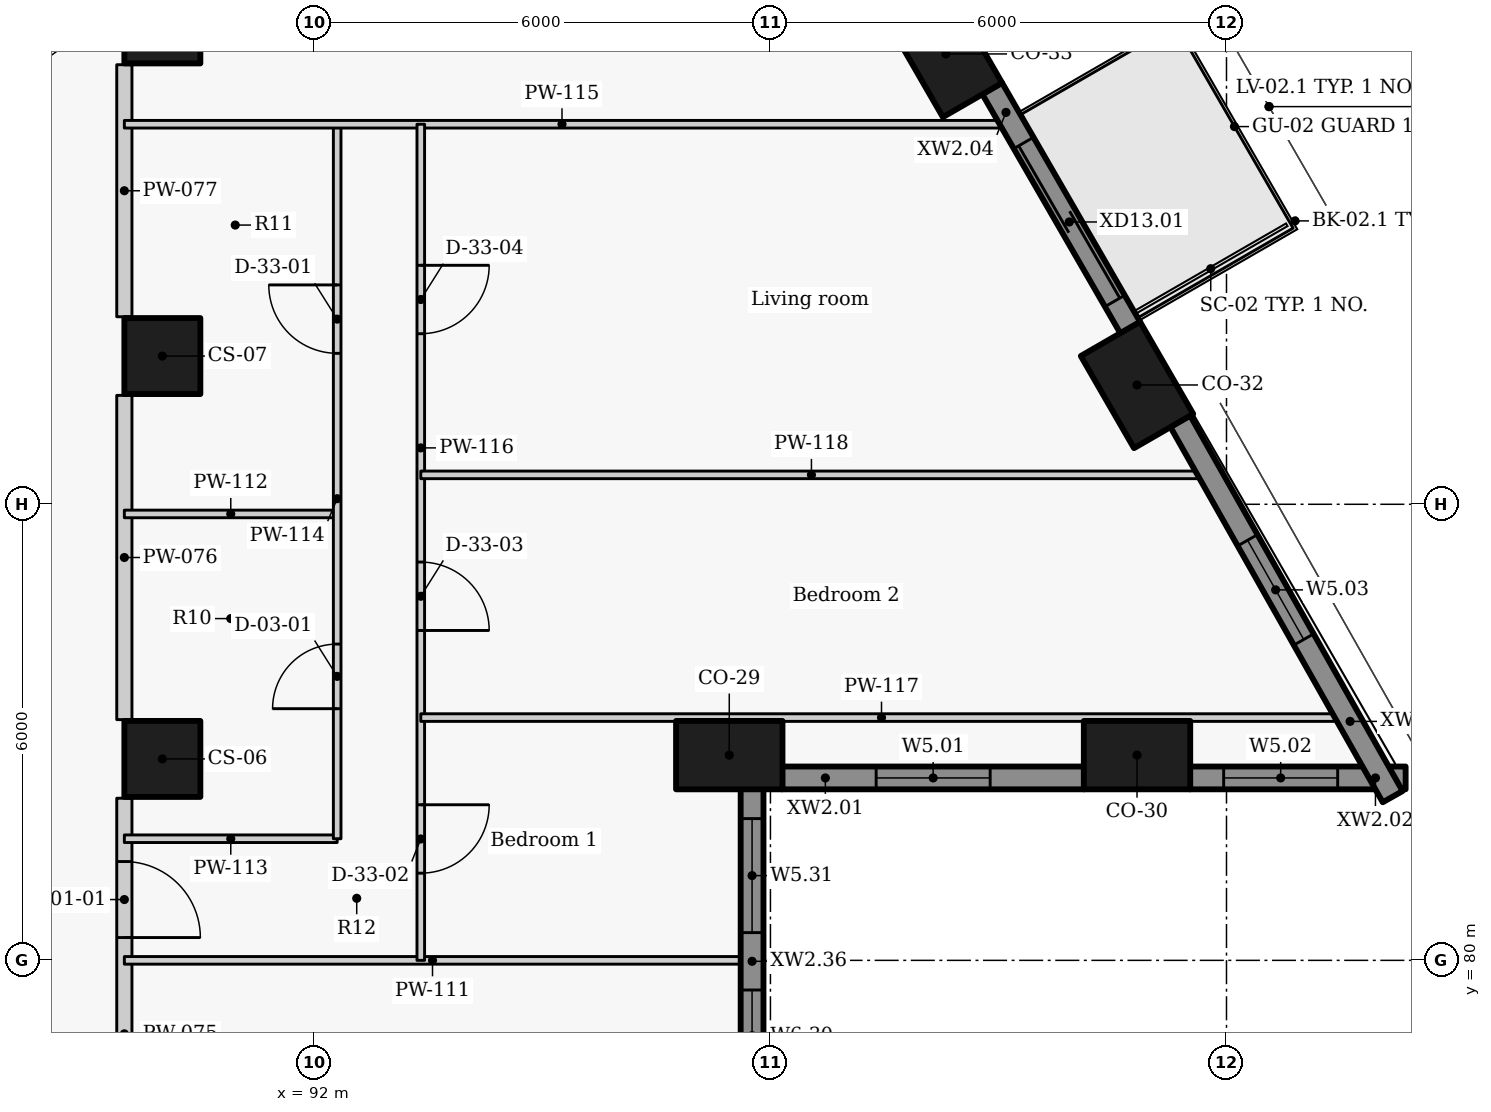
"""IFC4 building model, lengths in metres.
Left out: names, types, materials, properties, quantities, classifications, styles, units other than length and angle.
Written with IfcOpenShell. Run it as: python <this file> out.ifc"""

import sys

from ifc_helpers import new_model, si_unit, direction, frame, frame_2d, origin, origin_2d, place, context, subcontext, project, spatial, rectangle, extrude, element, fill, save


model = new_model("IFC4")
c1 = context("Model", 3, precision=1e-05, world=origin(), true_north=direction((0.0, 1.0)))
c2 = subcontext(c1, "Body", "Model", "MODEL_VIEW")
j1 = project(units=[si_unit("LENGTHUNIT", "METRE"), si_unit("PLANEANGLEUNIT", "RADIAN")], contexts=[c1])
p1 = place(None, origin())
s1 = spatial("IfcSite", under=j1, at=p1, CompositionType="ELEMENT")
p2 = place(p1, origin())
s2 = spatial("IfcBuilding", under=s1, at=p2, CompositionType="ELEMENT")
p3 = place(p2, frame((0.0, 0.0, 114.0)))
s3 = spatial("IfcBuildingStorey", under=s2, at=p3, CompositionType="ELEMENT", Elevation=114.0)
for number, where, z_axis, x_axis in (
    (1, (97.458, 82.7, 0.0), (0.0, 0.0, 1.0), (1.0, 0.0, 0.0)),
    (2, (102.823, 82.7, 0.0), (0.0, 0.0, 1.0), (1.0, 0.0, 0.0)),
    (3, (102.823, 87.57, 0.0), (0.0, 0.0, 1.0), (-0.5, 0.866, 0.0)),
    (4, (100.308, 91.925, 0.0), (0.0, 0.0, 1.0), (-0.5, 0.866, 0.0)),
):
    element("IfcColumn", number, at=place(p3, frame(where, z_axis=z_axis, x_axis=x_axis)), inside=s3, PredefinedType="COLUMN", context=c2, shape_type="SweptSolid", body=[
        extrude(rectangle(XDim=1.4, YDim=0.9, at=origin_2d()), origin(), (0.0, 0.0, 1.0), 3.3),
    ])
for number, where, z_axis, x_axis in (
    (5, (90.0, 82.65, 0.0), (0.0, 0.0, 1.0), (0.0, 1.0, 0.0)),
    (6, (90.0, 87.95, 0.0), (0.0, 0.0, 1.0), (0.0, 1.0, 0.0)),
    (7, (90.0, 92.3, 0.0), (0.0, 0.0, 1.0), (0.0, 1.0, 0.0)),
):
    element("IfcColumn", number, at=place(p3, frame(where, z_axis=z_axis, x_axis=x_axis)), inside=s3, PredefinedType="COLUMN", context=c2, shape_type="SweptSolid", body=[
        extrude(rectangle(XDim=1.0, YDim=1.0, at=origin_2d()), origin(), (0.0, 0.0, 1.0), 3.3),
    ])
p4 = place(p3, frame((98.154, 82.4, 0.0), z_axis=(0.0, 0.0, 1.0), x_axis=(1.0, 0.0, 0.0)))
e8 = element("IfcWall", 8, at=p4, inside=s3, PredefinedType="SOLIDWALL", context=c2, shape_type="SweptSolid", body=[
    extrude(rectangle(XDim=3.973, YDim=0.3, at=frame_2d((1.986, 0.0))), origin(), (0.0, 0.0, 1.0), 2.425),
])
p5 = place(p4, frame((1.236, 0.0, 0.9)))
e9 = element("IfcOpeningElement", 9, at=p5, cuts=e8, PredefinedType="OPENING", context=c2, shape_type="SweptSolid", body=[
    extrude(rectangle(XDim=1.5, YDim=1.1, at=frame_2d((0.75, 0.55))), frame((0.0, 0.16, 0.0), z_axis=(0.0, -1.0, 0.0), x_axis=(1.0, 0.0, 0.0)), (0.0, 0.0, 1.0), 0.32),
])
p6 = place(p3, frame((103.519, 82.4, 0.0), z_axis=(0.0, 0.0, 1.0), x_axis=(1.0, 0.0, 0.0)))
e10 = element("IfcWall", 10, at=p6, inside=s3, PredefinedType="SOLIDWALL", context=c2, shape_type="SweptSolid", body=[
    extrude(rectangle(XDim=2.838, YDim=0.3, at=frame_2d((1.419, 0.0))), origin(), (0.0, 0.0, 1.0), 2.425),
])
p7 = place(p6, frame((0.444, 0.0, 0.9)))
e11 = element("IfcOpeningElement", 11, at=p7, cuts=e10, PredefinedType="OPENING", context=c2, shape_type="SweptSolid", body=[
    extrude(rectangle(XDim=1.5, YDim=1.1, at=frame_2d((0.75, 0.55))), frame((0.0, 0.16, 0.0), z_axis=(0.0, -1.0, 0.0), x_axis=(1.0, 0.0, 0.0)), (0.0, 0.0, 1.0), 0.32),
])
p8 = place(p3, frame((106.186, 82.153, 0.0), z_axis=(0.0, 0.0, 1.0), x_axis=(-0.492456858874, 0.870336855561, 0.0)))
e12 = element("IfcWall", 12, at=p8, inside=s3, PredefinedType="SOLIDWALL", context=c2, shape_type="SweptSolid", body=[
    extrude(rectangle(XDim=5.677, YDim=0.3, at=frame_2d((2.838, 0.0))), origin(), (0.0, 0.0, 1.0), 2.425),
])
p9 = place(p8, frame((2.376, 0.0, 0.9)))
e13 = element("IfcOpeningElement", 13, at=p9, cuts=e12, PredefinedType="OPENING", context=c2, shape_type="SweptSolid", body=[
    extrude(rectangle(XDim=1.5, YDim=1.1, at=frame_2d((0.75, 0.55))), frame((0.0, 0.16, 0.0), z_axis=(0.0, -1.0, 0.0), x_axis=(1.0, 0.0, 0.0)), (0.0, 0.0, 1.0), 0.32),
])
p10 = place(p3, frame((102.735, 88.323, 0.0), z_axis=(0.0, 0.0, 1.0), x_axis=(-0.500009139881, 0.866020126807, 0.0)))
e14 = element("IfcWall", 14, at=p10, inside=s3, PredefinedType="SOLIDWALL", context=c2, shape_type="SweptSolid", body=[
    extrude(rectangle(XDim=3.637, YDim=0.3, at=frame_2d((1.818, 0.0))), origin(), (0.0, 0.0, 1.0), 2.425),
])
p11 = place(p10, frame((0.407, 0.0, 0.0)))
e15 = element("IfcOpeningElement", 15, at=p11, cuts=e14, PredefinedType="OPENING", context=c2, shape_type="SweptSolid", body=[
    extrude(rectangle(XDim=2.4, YDim=2.0, at=frame_2d((1.2, 1.0))), frame((0.0, 0.16, 0.0), z_axis=(0.0, -1.0, 0.0), x_axis=(1.0, 0.0, 0.0)), (0.0, 0.0, 1.0), 0.32),
])
p12 = place(p3, frame((97.758, 77.996, 0.0), z_axis=(0.0, 0.0, 1.0), x_axis=(0.0, 1.0, 0.0)))
e16 = element("IfcWall", 16, at=p12, inside=s3, PredefinedType="SOLIDWALL", context=c2, shape_type="SweptSolid", body=[
    extrude(rectangle(XDim=4.258, YDim=0.3, at=frame_2d((2.129, 0.0))), origin(), (0.0, 0.0, 1.0), 2.425),
])
p13 = place(p12, frame((0.414, 0.0, 0.9)))
e17 = element("IfcOpeningElement", 17, at=p13, cuts=e16, PredefinedType="OPENING", context=c2, shape_type="SweptSolid", body=[
    extrude(rectangle(XDim=1.2, YDim=1.1, at=frame_2d((0.6, 0.55))), frame((0.0, 0.16, 0.0), z_axis=(0.0, -1.0, 0.0), x_axis=(1.0, 0.0, 0.0)), (0.0, 0.0, 1.0), 0.32),
])
p14 = place(p12, frame((2.369, 0.0, 0.9)))
e18 = element("IfcOpeningElement", 18, at=p14, cuts=e16, PredefinedType="OPENING", context=c2, shape_type="SweptSolid", body=[
    extrude(rectangle(XDim=1.5, YDim=1.1, at=frame_2d((0.75, 0.55))), frame((0.0, 0.16, 0.0), z_axis=(0.0, -1.0, 0.0), x_axis=(1.0, 0.0, 0.0)), (0.0, 0.0, 1.0), 0.32),
])
p15 = place(p3, frame((89.5, 82.133, 0.0), z_axis=(0.0, 0.0, 1.0), x_axis=(0.0, -1.0, 0.0)))
e19 = element("IfcWall", 19, at=p15, inside=s3, PredefinedType="PARTITIONING", context=c2, shape_type="SweptSolid", body=[
    extrude(rectangle(XDim=4.266, YDim=0.2, at=frame_2d((2.133, 0.0))), origin(), (0.0, 0.0, 1.0), 3.025),
])
p16 = place(p15, frame((0.833, 0.0, 0.0)))
e20 = element("IfcOpeningElement", 20, at=p16, cuts=e19, PredefinedType="OPENING", context=c2, shape_type="SweptSolid", body=[
    extrude(rectangle(XDim=1.0, YDim=2.1, at=frame_2d((0.5, 1.05))), frame((0.0, 0.11, 0.0), z_axis=(0.0, -1.0, 0.0), x_axis=(1.0, 0.0, 0.0)), (0.0, 0.0, 1.0), 0.22),
])
p17 = place(p3, frame((89.5, 83.167, 0.0), z_axis=(0.0, 0.0, 1.0), x_axis=(0.0, 1.0, 0.0)))
e21 = element("IfcWall", 21, at=p17, inside=s3, PredefinedType="PARTITIONING", context=c2, shape_type="SweptSolid", body=[
    extrude(rectangle(XDim=4.266, YDim=0.2, at=frame_2d((2.133, 0.0))), origin(), (0.0, 0.0, 1.0), 3.025),
])
p18 = place(p3, frame((89.5, 88.467, 0.0), z_axis=(0.0, 0.0, 1.0), x_axis=(0.0, 1.0, 0.0)))
e22 = element("IfcWall", 22, at=p18, inside=s3, PredefinedType="PARTITIONING", context=c2, shape_type="SweptSolid", body=[
    extrude(rectangle(XDim=3.316, YDim=0.2, at=frame_2d((1.658, 0.0))), origin(), (0.0, 0.0, 1.0), 3.025),
])
p19 = place(p3, frame((89.5, 80.0, 0.0), z_axis=(0.0, 0.0, 1.0), x_axis=(1.0, 0.0, 0.0)))
e23 = element("IfcWall", 23, at=p19, inside=s3, PredefinedType="PARTITIONING", context=c2, shape_type="SweptSolid", body=[
    extrude(rectangle(XDim=8.108, YDim=0.1, at=frame_2d((4.054, 0.0))), origin(), (0.0, 0.0, 1.0), 2.405),
])
for number, where, z_axis, x_axis in (
    (24, (89.5, 85.873, 0.0), (0.0, 0.0, 1.0), (1.0, 0.0, 0.0)),
    (25, (89.5, 81.6, 0.0), (0.0, 0.0, 1.0), (1.0, 0.0, 0.0)),
):
    element("IfcWall", number, at=place(p3, frame(where, z_axis=z_axis, x_axis=x_axis)), inside=s3, PredefinedType="PARTITIONING", context=c2, shape_type="SweptSolid", body=[
        extrude(rectangle(XDim=2.8, YDim=0.1, at=frame_2d((1.4, 0.0))), origin(), (0.0, 0.0, 1.0), 2.505),
    ])
p20 = place(p3, frame((92.3, 81.6, 0.0), z_axis=(0.0, 0.0, 1.0), x_axis=(0.0, 1.0, 0.0)))
e26 = element("IfcWall", 26, at=p20, inside=s3, PredefinedType="PARTITIONING", context=c2, shape_type="SweptSolid", body=[
    extrude(rectangle(XDim=9.4, YDim=0.1, at=frame_2d((4.7, 0.0))), origin(), (0.0, 0.0, 1.0), 3.025),
])
p21 = place(p20, frame((1.711, 0.0, 0.0)))
e27 = element("IfcOpeningElement", 27, at=p21, cuts=e26, PredefinedType="OPENING", context=c2, shape_type="SweptSolid", body=[
    extrude(rectangle(XDim=0.85, YDim=2.1, at=frame_2d((0.425, 1.05))), frame((0.0, 0.06, 0.0), z_axis=(0.0, -1.0, 0.0), x_axis=(1.0, 0.0, 0.0)), (0.0, 0.0, 1.0), 0.12),
])
p22 = place(p20, frame((6.386, 0.0, 0.0)))
e28 = element("IfcOpeningElement", 28, at=p22, cuts=e26, PredefinedType="OPENING", context=c2, shape_type="SweptSolid", body=[
    extrude(rectangle(XDim=0.9, YDim=2.1, at=frame_2d((0.45, 1.05))), frame((0.0, 0.06, 0.0), z_axis=(0.0, -1.0, 0.0), x_axis=(1.0, 0.0, 0.0)), (0.0, 0.0, 1.0), 0.12),
])
p23 = place(p3, frame((89.5, 91.0, 0.0), z_axis=(0.0, 0.0, 1.0), x_axis=(1.0, 0.0, 0.0)))
e29 = element("IfcWall", 29, at=p23, inside=s3, PredefinedType="PARTITIONING", context=c2, shape_type="SweptSolid", body=[
    extrude(rectangle(XDim=11.515, YDim=0.1, at=frame_2d((5.758, 0.0))), origin(), (0.0, 0.0, 1.0), 2.405),
])
p24 = place(p3, frame((93.4, 91.0, 0.0), z_axis=(0.0, 0.0, 1.0), x_axis=(0.0, -1.0, 0.0)))
e30 = element("IfcWall", 30, at=p24, inside=s3, PredefinedType="PARTITIONING", context=c2, shape_type="SweptSolid", body=[
    extrude(rectangle(XDim=11.0, YDim=0.1, at=frame_2d((5.5, 0.0))), origin(), (0.0, 0.0, 1.0), 3.025),
])
p25 = place(p24, frame((8.953, 0.0, 0.0)))
e31 = element("IfcOpeningElement", 31, at=p25, cuts=e30, PredefinedType="OPENING", context=c2, shape_type="SweptSolid", body=[
    extrude(rectangle(XDim=0.9, YDim=2.1, at=frame_2d((0.45, 1.05))), frame((0.0, 0.06, 0.0), z_axis=(0.0, -1.0, 0.0), x_axis=(1.0, 0.0, 0.0)), (0.0, 0.0, 1.0), 0.12),
])
p26 = place(p24, frame((5.76, 0.0, 0.0)))
e32 = element("IfcOpeningElement", 32, at=p26, cuts=e30, PredefinedType="OPENING", context=c2, shape_type="SweptSolid", body=[
    extrude(rectangle(XDim=0.9, YDim=2.1, at=frame_2d((0.45, 1.05))), frame((0.0, 0.06, 0.0), z_axis=(0.0, -1.0, 0.0), x_axis=(1.0, 0.0, 0.0)), (0.0, 0.0, 1.0), 0.12),
])
p27 = place(p24, frame((1.856, 0.0, 0.0)))
e33 = element("IfcOpeningElement", 33, at=p27, cuts=e30, PredefinedType="OPENING", context=c2, shape_type="SweptSolid", body=[
    extrude(rectangle(XDim=0.9, YDim=2.1, at=frame_2d((0.45, 1.05))), frame((0.0, 0.06, 0.0), z_axis=(0.0, -1.0, 0.0), x_axis=(1.0, 0.0, 0.0)), (0.0, 0.0, 1.0), 0.12),
])
p28 = place(p3, frame((93.4, 83.194, 0.0), z_axis=(0.0, 0.0, 1.0), x_axis=(1.0, 0.0, 0.0)))
e34 = element("IfcWall", 34, at=p28, inside=s3, PredefinedType="PARTITIONING", context=c2, shape_type="SweptSolid", body=[
    extrude(rectangle(XDim=12.123, YDim=0.1, at=frame_2d((6.062, 0.0))), origin(), (0.0, 0.0, 1.0), 2.405),
])
p29 = place(p3, frame((93.4, 86.387, 0.0), z_axis=(0.0, 0.0, 1.0), x_axis=(1.0, 0.0, 0.0)))
e35 = element("IfcWall", 35, at=p29, inside=s3, PredefinedType="PARTITIONING", context=c2, shape_type="SweptSolid", body=[
    extrude(rectangle(XDim=10.279, YDim=0.1, at=frame_2d((5.139, 0.0))), origin(), (0.0, 0.0, 1.0), 2.405),
])
p30 = place(p5, origin())
e36 = element("IfcWindow", 36, at=p30, inside=s3, PartitioningType="SINGLE_PANEL", PredefinedType="WINDOW", context=c2, shape_type="SweptSolid", body=[
    extrude(rectangle(XDim=1.5, YDim=1.1, at=frame_2d((0.75, 0.55))), frame((0.0, 0.03, 0.0), z_axis=(0.0, -1.0, 0.0), x_axis=(1.0, 0.0, 0.0)), (0.0, 0.0, 1.0), 0.06),
])
fill(e9, e36)
p31 = place(p7, origin())
e37 = element("IfcWindow", 37, at=p31, inside=s3, PartitioningType="SINGLE_PANEL", PredefinedType="WINDOW", context=c2, shape_type="SweptSolid", body=[
    extrude(rectangle(XDim=1.5, YDim=1.1, at=frame_2d((0.75, 0.55))), frame((0.0, 0.03, 0.0), z_axis=(0.0, -1.0, 0.0), x_axis=(1.0, 0.0, 0.0)), (0.0, 0.0, 1.0), 0.06),
])
fill(e11, e37)
p32 = place(p9, origin())
e38 = element("IfcWindow", 38, at=p32, inside=s3, PartitioningType="SINGLE_PANEL", PredefinedType="WINDOW", context=c2, shape_type="SweptSolid", body=[
    extrude(rectangle(XDim=1.5, YDim=1.1, at=frame_2d((0.75, 0.55))), frame((0.0, 0.03, 0.0), z_axis=(0.0, -1.0, 0.0), x_axis=(1.0, 0.0, 0.0)), (0.0, 0.0, 1.0), 0.06),
])
fill(e13, e38)
p33 = place(p11, origin())
e39 = element("IfcDoor", 39, at=p33, inside=s3, OperationType="DOUBLE_DOOR_SLIDING", PredefinedType="DOOR", context=c2, shape_type="SweptSolid", body=[
    extrude(rectangle(XDim=2.4, YDim=2.0, at=frame_2d((1.2, 1.0))), frame((0.0, 0.025, 0.0), z_axis=(0.0, -1.0, 0.0), x_axis=(1.0, 0.0, 0.0)), (0.0, 0.0, 1.0), 0.05),
])
fill(e15, e39)
p34 = place(p13, origin())
e40 = element("IfcWindow", 40, at=p34, inside=s3, PartitioningType="SINGLE_PANEL", PredefinedType="WINDOW", context=c2, shape_type="SweptSolid", body=[
    extrude(rectangle(XDim=1.2, YDim=1.1, at=frame_2d((0.6, 0.55))), frame((0.0, 0.03, 0.0), z_axis=(0.0, -1.0, 0.0), x_axis=(1.0, 0.0, 0.0)), (0.0, 0.0, 1.0), 0.06),
])
fill(e17, e40)
p35 = place(p14, origin())
e41 = element("IfcWindow", 41, at=p35, inside=s3, PartitioningType="SINGLE_PANEL", PredefinedType="WINDOW", context=c2, shape_type="SweptSolid", body=[
    extrude(rectangle(XDim=1.5, YDim=1.1, at=frame_2d((0.75, 0.55))), frame((0.0, 0.03, 0.0), z_axis=(0.0, -1.0, 0.0), x_axis=(1.0, 0.0, 0.0)), (0.0, 0.0, 1.0), 0.06),
])
fill(e18, e41)
p36 = place(p16, origin())
e42 = element("IfcDoor", 42, at=p36, inside=s3, OperationType="SINGLE_SWING_RIGHT", PredefinedType="DOOR", context=c2, shape_type="SweptSolid", body=[
    extrude(rectangle(XDim=1.0, YDim=2.1, at=frame_2d((0.5, 1.05))), frame((0.0, 0.025, 0.0), z_axis=(0.0, -1.0, 0.0), x_axis=(1.0, 0.0, 0.0)), (0.0, 0.0, 1.0), 0.05),
])
fill(e20, e42)
p37 = place(p21, origin())
e43 = element("IfcDoor", 43, at=p37, inside=s3, OperationType="SINGLE_SWING_LEFT", PredefinedType="DOOR", context=c2, shape_type="SweptSolid", body=[
    extrude(rectangle(XDim=0.85, YDim=2.1, at=frame_2d((0.425, 1.05))), frame((0.0, 0.025, 0.0), z_axis=(0.0, -1.0, 0.0), x_axis=(1.0, 0.0, 0.0)), (0.0, 0.0, 1.0), 0.05),
])
fill(e27, e43)
p38 = place(p22, origin())
e44 = element("IfcDoor", 44, at=p38, inside=s3, OperationType="SINGLE_SWING_RIGHT", PredefinedType="DOOR", context=c2, shape_type="SweptSolid", body=[
    extrude(rectangle(XDim=0.9, YDim=2.1, at=frame_2d((0.45, 1.05))), frame((0.0, 0.025, 0.0), z_axis=(0.0, -1.0, 0.0), x_axis=(1.0, 0.0, 0.0)), (0.0, 0.0, 1.0), 0.05),
])
fill(e28, e44)
p39 = place(p25, origin())
e45 = element("IfcDoor", 45, at=p39, inside=s3, OperationType="SINGLE_SWING_LEFT", PredefinedType="DOOR", context=c2, shape_type="SweptSolid", body=[
    extrude(rectangle(XDim=0.9, YDim=2.1, at=frame_2d((0.45, 1.05))), frame((0.0, 0.025, 0.0), z_axis=(0.0, -1.0, 0.0), x_axis=(1.0, 0.0, 0.0)), (0.0, 0.0, 1.0), 0.05),
])
fill(e31, e45)
p40 = place(p26, origin())
e46 = element("IfcDoor", 46, at=p40, inside=s3, OperationType="SINGLE_SWING_RIGHT", PredefinedType="DOOR", context=c2, shape_type="SweptSolid", body=[
    extrude(rectangle(XDim=0.9, YDim=2.1, at=frame_2d((0.45, 1.05))), frame((0.0, 0.025, 0.0), z_axis=(0.0, -1.0, 0.0), x_axis=(1.0, 0.0, 0.0)), (0.0, 0.0, 1.0), 0.05),
])
fill(e32, e46)
p41 = place(p27, origin())
e47 = element("IfcDoor", 47, at=p41, inside=s3, OperationType="SINGLE_SWING_LEFT", PredefinedType="DOOR", context=c2, shape_type="SweptSolid", body=[
    extrude(rectangle(XDim=0.9, YDim=2.1, at=frame_2d((0.45, 1.05))), frame((0.0, 0.025, 0.0), z_axis=(0.0, -1.0, 0.0), x_axis=(1.0, 0.0, 0.0)), (0.0, 0.0, 1.0), 0.05),
])
fill(e33, e47)
save(model, sys.argv[1])
